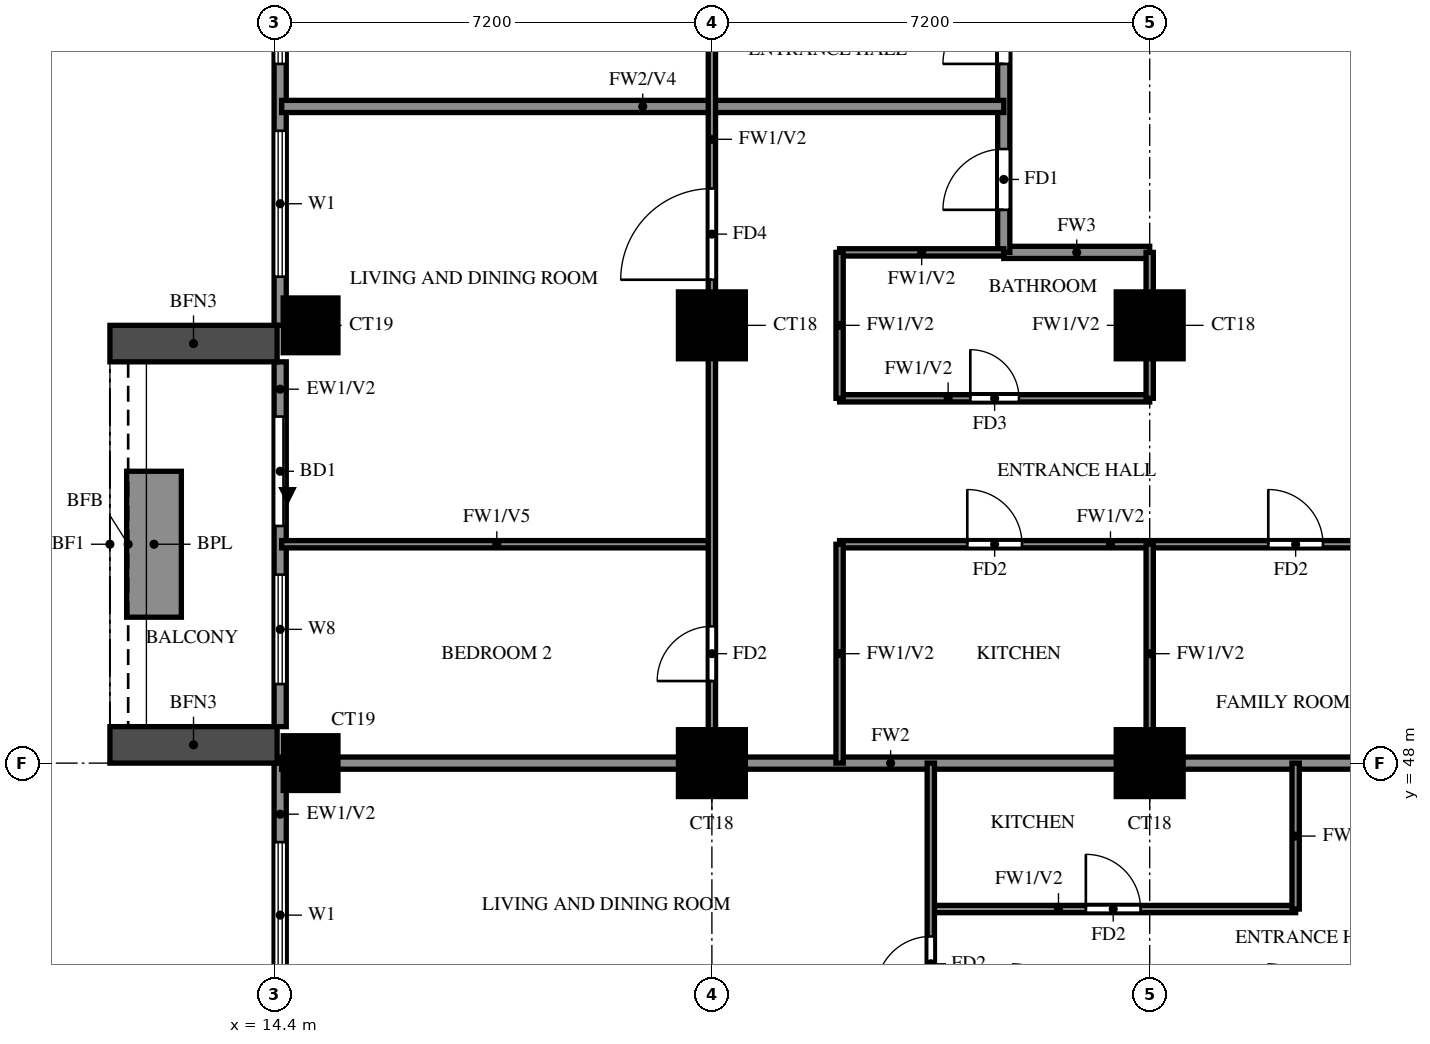
"""IFC4 building model, lengths in metres.
Left out: names, types, materials, properties, quantities, classifications, styles, units other than length and angle.
Written with IfcOpenShell. Run it as: python <this file> out.ifc"""

import sys

from ifc_helpers import new_model, si_unit, direction, frame, frame_2d, origin, origin_2d, place, context, subcontext, project, spatial, rectangle, extrude, source, transform, mapped, element, fill, save


model = new_model("IFC4")
c1 = context("Model", 3, precision=1e-05, world=origin(), true_north=direction((0.0, 1.0)))
c2 = subcontext(c1, "Body", "Model", "MODEL_VIEW")
j1 = project(units=[si_unit("LENGTHUNIT", "METRE"), si_unit("PLANEANGLEUNIT", "RADIAN")], contexts=[c1])
p1 = place(None, origin())
s1 = spatial("IfcSite", under=j1, at=p1, CompositionType="ELEMENT")
p2 = place(p1, origin())
s2 = spatial("IfcBuilding", under=s1, at=p2, CompositionType="ELEMENT")
p3 = place(p2, frame((0.0, 0.0, 130.5)))
s3 = spatial("IfcBuildingStorey", under=s2, at=p3, CompositionType="ELEMENT", Elevation=130.5)
m1 = source(origin(), c2, "Body", "SweptSolid", [
    extrude(rectangle(XDim=0.9, YDim=0.9, at=origin_2d()), origin(), (0.0, 0.0, 1.0), 3.2),
])
p4 = place(p3, frame((15.0, 48.0, 0.0), z_axis=(0.0, 0.0, 1.0), x_axis=(1.0, 0.0, 0.0)))
e1 = element("IfcColumn", 1, at=p4, inside=s3, PredefinedType="COLUMN", context=c2, shape_type="MappedRepresentation", body=[
    mapped(m1, transform((0.0, 0.0, 0.0))),
])
m2 = source(origin(), c2, "Body", "SweptSolid", [
    extrude(rectangle(XDim=1.1, YDim=1.1, at=origin_2d()), origin(), (0.0, 0.0, 1.0), 3.2),
])
for number, where, z_axis, x_axis in (
    (2, (21.6, 48.0, 0.0), (0.0, 0.0, 1.0), (1.0, 0.0, 0.0)),
    (3, (28.8, 48.0, 0.0), (0.0, 0.0, 1.0), (1.0, 0.0, 0.0)),
):
    element("IfcColumn", number, at=place(p3, frame(where, z_axis=z_axis, x_axis=x_axis)), inside=s3, PredefinedType="COLUMN", context=c2, shape_type="MappedRepresentation", body=[
        mapped(m2, transform((0.0, 0.0, 0.0))),
    ])
p5 = place(p3, frame((15.0, 55.2, 0.0), z_axis=(0.0, 0.0, 1.0), x_axis=(1.0, 0.0, 0.0)))
e4 = element("IfcColumn", 4, at=p5, inside=s3, PredefinedType="COLUMN", context=c2, shape_type="MappedRepresentation", body=[
    mapped(m1, transform((0.0, 0.0, 0.0))),
])
for number, where, z_axis, x_axis in (
    (5, (21.6, 55.2, 0.0), (0.0, 0.0, 1.0), (1.0, 0.0, 0.0)),
    (6, (28.8, 55.2, 0.0), (0.0, 0.0, 1.0), (1.0, 0.0, 0.0)),
):
    element("IfcColumn", number, at=place(p3, frame(where, z_axis=z_axis, x_axis=x_axis)), inside=s3, PredefinedType="COLUMN", context=c2, shape_type="MappedRepresentation", body=[
        mapped(m2, transform((0.0, 0.0, 0.0))),
    ])
p6 = place(p3, frame((14.5, 62.4, 0.0), z_axis=(0.0, 0.0, 1.0), x_axis=(0.0, -1.0, 0.0)))
e7 = element("IfcWall", 7, at=p6, inside=s3, PredefinedType="SOLIDWALL", context=c2, shape_type="SweptSolid", body=[
    extrude(rectangle(XDim=7.2, YDim=0.2, at=frame_2d((3.6, 0.0))), origin(), (0.0, 0.0, 1.0), 3.2),
])
p7 = place(p6, frame((4.0, 0.0, 0.6)))
e8 = element("IfcOpeningElement", 8, at=p7, cuts=e7, PredefinedType="OPENING", context=c2, shape_type="SweptSolid", body=[
    extrude(rectangle(XDim=2.4, YDim=2.4, at=frame_2d((1.2, 1.2))), frame((0.0, 0.11, 0.0), z_axis=(0.0, -1.0, 0.0), x_axis=(1.0, 0.0, 0.0)), (0.0, 0.0, 1.0), 0.22),
])
p8 = place(p6, frame((1.1, 0.0, 0.6)))
e9 = element("IfcOpeningElement", 9, at=p8, cuts=e7, PredefinedType="OPENING", context=c2, shape_type="SweptSolid", body=[
    extrude(rectangle(XDim=1.8, YDim=2.4, at=frame_2d((0.9, 1.2))), frame((0.0, 0.11, 0.0), z_axis=(0.0, -1.0, 0.0), x_axis=(1.0, 0.0, 0.0)), (0.0, 0.0, 1.0), 0.22),
])
p9 = place(p3, frame((14.5, 54.6, 0.0), z_axis=(0.0, 0.0, 1.0), x_axis=(0.0, -1.0, 0.0)))
e10 = element("IfcWall", 10, at=p9, inside=s3, PredefinedType="SOLIDWALL", context=c2, shape_type="SweptSolid", body=[
    extrude(rectangle(XDim=6.0, YDim=0.2, at=frame_2d((3.0, 0.0))), origin(), (0.0, 0.0, 1.0), 3.2),
])
p10 = place(p9, frame((0.9, 0.0, 0.0)))
e11 = element("IfcOpeningElement", 11, at=p10, cuts=e10, PredefinedType="OPENING", context=c2, shape_type="SweptSolid", body=[
    extrude(rectangle(XDim=1.8, YDim=2.4, at=frame_2d((0.9, 1.2))), frame((0.0, 0.11, 0.0), z_axis=(0.0, -1.0, 0.0), x_axis=(1.0, 0.0, 0.0)), (0.0, 0.0, 1.0), 0.22),
])
p11 = place(p9, frame((3.5, 0.0, 0.6)))
e12 = element("IfcOpeningElement", 12, at=p11, cuts=e10, PredefinedType="OPENING", context=c2, shape_type="SweptSolid", body=[
    extrude(rectangle(XDim=1.8, YDim=2.4, at=frame_2d((0.9, 1.2))), frame((0.0, 0.11, 0.0), z_axis=(0.0, -1.0, 0.0), x_axis=(1.0, 0.0, 0.0)), (0.0, 0.0, 1.0), 0.22),
])
p12 = place(p3, frame((14.5, 48.0, 0.0), z_axis=(0.0, 0.0, 1.0), x_axis=(0.0, -1.0, 0.0)))
e13 = element("IfcWall", 13, at=p12, inside=s3, PredefinedType="SOLIDWALL", context=c2, shape_type="SweptSolid", body=[
    extrude(rectangle(XDim=4.8, YDim=0.2, at=frame_2d((2.4, 0.0))), origin(), (0.0, 0.0, 1.0), 3.2),
])
p13 = place(p12, frame((1.3, 0.0, 0.6)))
e14 = element("IfcOpeningElement", 14, at=p13, cuts=e13, PredefinedType="OPENING", context=c2, shape_type="SweptSolid", body=[
    extrude(rectangle(XDim=2.4, YDim=2.4, at=frame_2d((1.2, 1.2))), frame((0.0, 0.11, 0.0), z_axis=(0.0, -1.0, 0.0), x_axis=(1.0, 0.0, 0.0)), (0.0, 0.0, 1.0), 0.22),
])
for number, where, z_axis, x_axis in (
    (15, (14.45, 54.9, 0.0), (0.0, 0.0, 1.0), (-1.0, 0.0, 0.0)),
    (16, (14.45, 48.3, 0.0), (0.0, 0.0, 1.0), (-1.0, 0.0, 0.0)),
):
    element("IfcWall", number, at=place(p3, frame(where, z_axis=z_axis, x_axis=x_axis)), inside=s3, PredefinedType="SOLIDWALL", context=c2, shape_type="SweptSolid", body=[
        extrude(rectangle(XDim=2.75, YDim=0.6, at=frame_2d((1.375, 0.0))), origin(), (0.0, 0.0, 1.0), 2.85),
    ])
p14 = place(p3, frame((12.425, 52.8, 0.0), z_axis=(0.0, 0.0, 1.0), x_axis=(0.0, -1.0, 0.0)))
e17 = element("IfcWall", 17, at=p14, inside=s3, PredefinedType="SOLIDWALL", context=c2, shape_type="SweptSolid", body=[
    extrude(rectangle(XDim=2.4, YDim=0.9, at=frame_2d((1.2, 0.0))), origin(), (0.0, 0.0, 1.0), 0.9),
])
p15 = place(p3, frame((26.4, 56.4, 0.0), z_axis=(0.0, 0.0, 1.0), x_axis=(1.0, 0.0, 0.0)))
e18 = element("IfcWall", 18, at=p15, inside=s3, PredefinedType="SOLIDWALL", context=c2, shape_type="SweptSolid", body=[
    extrude(rectangle(XDim=2.4, YDim=0.2, at=frame_2d((1.2, 0.0))), origin(), (0.0, 0.0, 1.0), 3.2),
])
p16 = place(p3, frame((26.4, 56.4, 0.0), z_axis=(0.0, 0.0, 1.0), x_axis=(0.0, 1.0, 0.0)))
e19 = element("IfcWall", 19, at=p16, inside=s3, PredefinedType="SOLIDWALL", context=c2, shape_type="SweptSolid", body=[
    extrude(rectangle(XDim=9.6, YDim=0.2, at=frame_2d((4.8, 0.0))), origin(), (0.0, 0.0, 1.0), 3.2),
])
p17 = place(p16, frame((0.7, 0.0, 0.0)))
e20 = element("IfcOpeningElement", 20, at=p17, cuts=e19, PredefinedType="OPENING", context=c2, shape_type="SweptSolid", body=[
    extrude(rectangle(XDim=1.0, YDim=2.1, at=frame_2d((0.5, 1.05))), frame((0.0, 0.11, 0.0), z_axis=(0.0, -1.0, 0.0), x_axis=(1.0, 0.0, 0.0)), (0.0, 0.0, 1.0), 0.22),
])
p18 = place(p16, frame((3.1, 0.0, 0.0)))
e21 = element("IfcOpeningElement", 21, at=p18, cuts=e19, PredefinedType="OPENING", context=c2, shape_type="SweptSolid", body=[
    extrude(rectangle(XDim=1.0, YDim=2.1, at=frame_2d((0.5, 1.05))), frame((0.0, 0.11, 0.0), z_axis=(0.0, -1.0, 0.0), x_axis=(1.0, 0.0, 0.0)), (0.0, 0.0, 1.0), 0.22),
])
p19 = place(p3, frame((14.525, 48.0, 0.0), z_axis=(0.0, 0.0, 1.0), x_axis=(1.0, 0.0, 0.0)))
e22 = element("IfcWall", 22, at=p19, inside=s3, PredefinedType="SOLIDWALL", context=c2, shape_type="SweptSolid", body=[
    extrude(rectangle(XDim=19.075, YDim=0.2, at=frame_2d((9.538, 0.0))), origin(), (0.0, 0.0, 1.0), 3.2),
])
p20 = place(p3, frame((14.525, 58.8, 0.0), z_axis=(0.0, 0.0, 1.0), x_axis=(1.0, 0.0, 0.0)))
e23 = element("IfcWall", 23, at=p20, inside=s3, PredefinedType="SOLIDWALL", context=c2, shape_type="SweptSolid", body=[
    extrude(rectangle(XDim=11.875, YDim=0.2, at=frame_2d((5.938, 0.0))), origin(), (0.0, 0.0, 1.0), 2.3),
])
p21 = place(p3, frame((25.2, 45.6, 0.0), z_axis=(0.0, 0.0, 1.0), x_axis=(1.0, 0.0, 0.0)))
e24 = element("IfcWall", 24, at=p21, inside=s3, PredefinedType="PARTITIONING", context=c2, shape_type="SweptSolid", body=[
    extrude(rectangle(XDim=6.0, YDim=0.12, at=frame_2d((3.0, 0.0))), origin(), (0.0, 0.0, 1.0), 3.2),
])
p22 = place(p21, frame((2.55, 0.0, 0.0)))
e25 = element("IfcOpeningElement", 25, at=p22, cuts=e24, PredefinedType="OPENING", context=c2, shape_type="SweptSolid", body=[
    extrude(rectangle(XDim=0.9, YDim=2.1, at=frame_2d((0.45, 1.05))), frame((0.0, 0.07, 0.0), z_axis=(0.0, -1.0, 0.0), x_axis=(1.0, 0.0, 0.0)), (0.0, 0.0, 1.0), 0.14),
])
p23 = place(p3, frame((14.525, 51.6, 0.0), z_axis=(0.0, 0.0, 1.0), x_axis=(1.0, 0.0, 0.0)))
e26 = element("IfcWall", 26, at=p23, inside=s3, PredefinedType="PARTITIONING", context=c2, shape_type="SweptSolid", body=[
    extrude(rectangle(XDim=7.075, YDim=0.12, at=frame_2d((3.538, 0.0))), origin(), (0.0, 0.0, 1.0), 2.3),
])
p24 = place(p3, frame((23.7, 51.6, 0.0), z_axis=(0.0, 0.0, 1.0), x_axis=(1.0, 0.0, 0.0)))
e27 = element("IfcWall", 27, at=p24, inside=s3, PredefinedType="PARTITIONING", context=c2, shape_type="SweptSolid", body=[
    extrude(rectangle(XDim=9.9, YDim=0.12, at=frame_2d((4.95, 0.0))), origin(), (0.0, 0.0, 1.0), 3.2),
])
p25 = place(p24, frame((2.1, 0.0, 0.0)))
e28 = element("IfcOpeningElement", 28, at=p25, cuts=e27, PredefinedType="OPENING", context=c2, shape_type="SweptSolid", body=[
    extrude(rectangle(XDim=0.9, YDim=2.1, at=frame_2d((0.45, 1.05))), frame((0.0, 0.07, 0.0), z_axis=(0.0, -1.0, 0.0), x_axis=(1.0, 0.0, 0.0)), (0.0, 0.0, 1.0), 0.14),
])
p26 = place(p24, frame((7.05, 0.0, 0.0)))
e29 = element("IfcOpeningElement", 29, at=p26, cuts=e27, PredefinedType="OPENING", context=c2, shape_type="SweptSolid", body=[
    extrude(rectangle(XDim=0.9, YDim=2.1, at=frame_2d((0.45, 1.05))), frame((0.0, 0.07, 0.0), z_axis=(0.0, -1.0, 0.0), x_axis=(1.0, 0.0, 0.0)), (0.0, 0.0, 1.0), 0.14),
])
p27 = place(p3, frame((23.7, 54.0, 0.0), z_axis=(0.0, 0.0, 1.0), x_axis=(1.0, 0.0, 0.0)))
e30 = element("IfcWall", 30, at=p27, inside=s3, PredefinedType="PARTITIONING", context=c2, shape_type="SweptSolid", body=[
    extrude(rectangle(XDim=5.1, YDim=0.12, at=frame_2d((2.55, 0.0))), origin(), (0.0, 0.0, 1.0), 3.2),
])
p28 = place(p27, frame((2.15, 0.0, 0.0)))
e31 = element("IfcOpeningElement", 31, at=p28, cuts=e30, PredefinedType="OPENING", context=c2, shape_type="SweptSolid", body=[
    extrude(rectangle(XDim=0.8, YDim=2.1, at=frame_2d((0.4, 1.05))), frame((0.0, 0.07, 0.0), z_axis=(0.0, -1.0, 0.0), x_axis=(1.0, 0.0, 0.0)), (0.0, 0.0, 1.0), 0.14),
])
p29 = place(p3, frame((23.7, 56.4, 0.0), z_axis=(0.0, 0.0, 1.0), x_axis=(1.0, 0.0, 0.0)))
e32 = element("IfcWall", 32, at=p29, inside=s3, PredefinedType="PARTITIONING", context=c2, shape_type="SweptSolid", body=[
    extrude(rectangle(XDim=2.7, YDim=0.12, at=frame_2d((1.35, 0.0))), origin(), (0.0, 0.0, 1.0), 3.2),
])
p30 = place(p3, frame((21.6, 48.0, 0.0), z_axis=(0.0, 0.0, 1.0), x_axis=(0.0, 1.0, 0.0)))
e33 = element("IfcWall", 33, at=p30, inside=s3, PredefinedType="PARTITIONING", context=c2, shape_type="SweptSolid", body=[
    extrude(rectangle(XDim=21.6, YDim=0.12, at=frame_2d((10.8, 0.0))), origin(), (0.0, 0.0, 1.0), 3.2),
])
p31 = place(p30, frame((1.35, 0.0, 0.0)))
e34 = element("IfcOpeningElement", 34, at=p31, cuts=e33, PredefinedType="OPENING", context=c2, shape_type="SweptSolid", body=[
    extrude(rectangle(XDim=0.9, YDim=2.1, at=frame_2d((0.45, 1.05))), frame((0.0, 0.07, 0.0), z_axis=(0.0, -1.0, 0.0), x_axis=(1.0, 0.0, 0.0)), (0.0, 0.0, 1.0), 0.14),
])
p32 = place(p30, frame((7.95, 0.0, 0.0)))
e35 = element("IfcOpeningElement", 35, at=p32, cuts=e33, PredefinedType="OPENING", context=c2, shape_type="SweptSolid", body=[
    extrude(rectangle(XDim=1.5, YDim=2.1, at=frame_2d((0.75, 1.05))), frame((0.0, 0.07, 0.0), z_axis=(0.0, -1.0, 0.0), x_axis=(1.0, 0.0, 0.0)), (0.0, 0.0, 1.0), 0.14),
])
p33 = place(p30, frame((12.15, 0.0, 0.0)))
e36 = element("IfcOpeningElement", 36, at=p33, cuts=e33, PredefinedType="OPENING", context=c2, shape_type="SweptSolid", body=[
    extrude(rectangle(XDim=0.9, YDim=2.1, at=frame_2d((0.45, 1.05))), frame((0.0, 0.07, 0.0), z_axis=(0.0, -1.0, 0.0), x_axis=(1.0, 0.0, 0.0)), (0.0, 0.0, 1.0), 0.14),
])
p34 = place(p30, frame((17.55, 0.0, 0.0)))
e37 = element("IfcOpeningElement", 37, at=p34, cuts=e33, PredefinedType="OPENING", context=c2, shape_type="SweptSolid", body=[
    extrude(rectangle(XDim=0.9, YDim=2.1, at=frame_2d((0.45, 1.05))), frame((0.0, 0.07, 0.0), z_axis=(0.0, -1.0, 0.0), x_axis=(1.0, 0.0, 0.0)), (0.0, 0.0, 1.0), 0.14),
])
p35 = place(p3, frame((23.7, 48.0, 0.0), z_axis=(0.0, 0.0, 1.0), x_axis=(0.0, 1.0, 0.0)))
e38 = element("IfcWall", 38, at=p35, inside=s3, PredefinedType="PARTITIONING", context=c2, shape_type="SweptSolid", body=[
    extrude(rectangle(XDim=3.6, YDim=0.12, at=frame_2d((1.8, 0.0))), origin(), (0.0, 0.0, 1.0), 3.2),
])
p36 = place(p3, frame((23.7, 54.0, 0.0), z_axis=(0.0, 0.0, 1.0), x_axis=(0.0, 1.0, 0.0)))
e39 = element("IfcWall", 39, at=p36, inside=s3, PredefinedType="PARTITIONING", context=c2, shape_type="SweptSolid", body=[
    extrude(rectangle(XDim=2.4, YDim=0.12, at=frame_2d((1.2, 0.0))), origin(), (0.0, 0.0, 1.0), 3.2),
])
p37 = place(p3, frame((25.2, 39.725, 0.0), z_axis=(0.0, 0.0, 1.0), x_axis=(0.0, 1.0, 0.0)))
e40 = element("IfcWall", 40, at=p37, inside=s3, PredefinedType="PARTITIONING", context=c2, shape_type="SweptSolid", body=[
    extrude(rectangle(XDim=8.275, YDim=0.12, at=frame_2d((4.137, 0.0))), origin(), (0.0, 0.0, 1.0), 3.2),
])
p38 = place(p37, frame((4.525, 0.0, 0.0)))
e41 = element("IfcOpeningElement", 41, at=p38, cuts=e40, PredefinedType="OPENING", context=c2, shape_type="SweptSolid", body=[
    extrude(rectangle(XDim=0.9, YDim=2.1, at=frame_2d((0.45, 1.05))), frame((0.0, 0.07, 0.0), z_axis=(0.0, -1.0, 0.0), x_axis=(1.0, 0.0, 0.0)), (0.0, 0.0, 1.0), 0.14),
])
p39 = place(p3, frame((28.8, 48.0, 0.0), z_axis=(0.0, 0.0, 1.0), x_axis=(0.0, 1.0, 0.0)))
e42 = element("IfcWall", 42, at=p39, inside=s3, PredefinedType="PARTITIONING", context=c2, shape_type="SweptSolid", body=[
    extrude(rectangle(XDim=3.6, YDim=0.12, at=frame_2d((1.8, 0.0))), origin(), (0.0, 0.0, 1.0), 3.2),
])
for number, where, z_axis, x_axis in (
    (43, (28.8, 54.0, 0.0), (0.0, 0.0, 1.0), (0.0, 1.0, 0.0)),
    (44, (31.2, 45.6, 0.0), (0.0, 0.0, 1.0), (0.0, 1.0, 0.0)),
):
    element("IfcWall", number, at=place(p3, frame(where, z_axis=z_axis, x_axis=x_axis)), inside=s3, PredefinedType="PARTITIONING", context=c2, shape_type="SweptSolid", body=[
        extrude(rectangle(XDim=2.4, YDim=0.12, at=frame_2d((1.2, 0.0))), origin(), (0.0, 0.0, 1.0), 3.2),
    ])
p40 = place(p7, origin())
e45 = element("IfcWindow", 45, at=p40, inside=s3, PartitioningType="DOUBLE_PANEL_VERTICAL", PredefinedType="WINDOW", context=c2, shape_type="SweptSolid", body=[
    extrude(rectangle(XDim=2.4, YDim=2.4, at=frame_2d((1.2, 1.2))), frame((0.0, 0.03, 0.0), z_axis=(0.0, -1.0, 0.0), x_axis=(1.0, 0.0, 0.0)), (0.0, 0.0, 1.0), 0.06),
])
fill(e8, e45)
p41 = place(p8, origin())
e46 = element("IfcWindow", 46, at=p41, inside=s3, PartitioningType="DOUBLE_PANEL_VERTICAL", PredefinedType="WINDOW", context=c2, shape_type="SweptSolid", body=[
    extrude(rectangle(XDim=1.8, YDim=2.4, at=frame_2d((0.9, 1.2))), frame((0.0, 0.03, 0.0), z_axis=(0.0, -1.0, 0.0), x_axis=(1.0, 0.0, 0.0)), (0.0, 0.0, 1.0), 0.06),
])
fill(e9, e46)
p42 = place(p10, origin())
e47 = element("IfcDoor", 47, at=p42, inside=s3, OperationType="DOUBLE_DOOR_SLIDING", PredefinedType="DOOR", context=c2, shape_type="SweptSolid", body=[
    extrude(rectangle(XDim=1.8, YDim=2.4, at=frame_2d((0.9, 1.2))), frame((0.0, 0.025, 0.0), z_axis=(0.0, -1.0, 0.0), x_axis=(1.0, 0.0, 0.0)), (0.0, 0.0, 1.0), 0.05),
])
fill(e11, e47)
p43 = place(p11, origin())
e48 = element("IfcWindow", 48, at=p43, inside=s3, PartitioningType="DOUBLE_PANEL_VERTICAL", PredefinedType="WINDOW", context=c2, shape_type="SweptSolid", body=[
    extrude(rectangle(XDim=1.8, YDim=2.4, at=frame_2d((0.9, 1.2))), frame((0.0, 0.03, 0.0), z_axis=(0.0, -1.0, 0.0), x_axis=(1.0, 0.0, 0.0)), (0.0, 0.0, 1.0), 0.06),
])
fill(e12, e48)
p44 = place(p13, origin())
e49 = element("IfcWindow", 49, at=p44, inside=s3, PartitioningType="DOUBLE_PANEL_VERTICAL", PredefinedType="WINDOW", context=c2, shape_type="SweptSolid", body=[
    extrude(rectangle(XDim=2.4, YDim=2.4, at=frame_2d((1.2, 1.2))), frame((0.0, 0.03, 0.0), z_axis=(0.0, -1.0, 0.0), x_axis=(1.0, 0.0, 0.0)), (0.0, 0.0, 1.0), 0.06),
])
fill(e14, e49)
p45 = place(p38, origin())
e50 = element("IfcDoor", 50, at=p45, inside=s3, OperationType="SINGLE_SWING_LEFT", PredefinedType="DOOR", context=c2, shape_type="SweptSolid", body=[
    extrude(rectangle(XDim=0.9, YDim=2.1, at=frame_2d((0.45, 1.05))), frame((0.0, 0.025, 0.0), z_axis=(0.0, -1.0, 0.0), x_axis=(1.0, 0.0, 0.0)), (0.0, 0.0, 1.0), 0.05),
])
fill(e41, e50)
p46 = place(p22, origin())
e51 = element("IfcDoor", 51, at=p46, inside=s3, OperationType="SINGLE_SWING_LEFT", PredefinedType="DOOR", context=c2, shape_type="SweptSolid", body=[
    extrude(rectangle(XDim=0.9, YDim=2.1, at=frame_2d((0.45, 1.05))), frame((0.0, 0.025, 0.0), z_axis=(0.0, -1.0, 0.0), x_axis=(1.0, 0.0, 0.0)), (0.0, 0.0, 1.0), 0.05),
])
fill(e25, e51)
p47 = place(p17, origin())
e52 = element("IfcDoor", 52, at=p47, inside=s3, OperationType="SINGLE_SWING_LEFT", PredefinedType="DOOR", context=c2, shape_type="SweptSolid", body=[
    extrude(rectangle(XDim=1.0, YDim=2.1, at=frame_2d((0.5, 1.05))), frame((0.0, 0.025, 0.0), z_axis=(0.0, -1.0, 0.0), x_axis=(1.0, 0.0, 0.0)), (0.0, 0.0, 1.0), 0.05),
])
fill(e20, e52)
p48 = place(p31, origin())
e53 = element("IfcDoor", 53, at=p48, inside=s3, OperationType="SINGLE_SWING_LEFT", PredefinedType="DOOR", context=c2, shape_type="SweptSolid", body=[
    extrude(rectangle(XDim=0.9, YDim=2.1, at=frame_2d((0.45, 1.05))), frame((0.0, 0.025, 0.0), z_axis=(0.0, -1.0, 0.0), x_axis=(1.0, 0.0, 0.0)), (0.0, 0.0, 1.0), 0.05),
])
fill(e34, e53)
p49 = place(p32, origin())
e54 = element("IfcDoor", 54, at=p49, inside=s3, OperationType="SINGLE_SWING_LEFT", PredefinedType="DOOR", context=c2, shape_type="SweptSolid", body=[
    extrude(rectangle(XDim=1.5, YDim=2.1, at=frame_2d((0.75, 1.05))), frame((0.0, 0.025, 0.0), z_axis=(0.0, -1.0, 0.0), x_axis=(1.0, 0.0, 0.0)), (0.0, 0.0, 1.0), 0.05),
])
fill(e35, e54)
p50 = place(p25, origin())
e55 = element("IfcDoor", 55, at=p50, inside=s3, OperationType="SINGLE_SWING_LEFT", PredefinedType="DOOR", context=c2, shape_type="SweptSolid", body=[
    extrude(rectangle(XDim=0.9, YDim=2.1, at=frame_2d((0.45, 1.05))), frame((0.0, 0.025, 0.0), z_axis=(0.0, -1.0, 0.0), x_axis=(1.0, 0.0, 0.0)), (0.0, 0.0, 1.0), 0.05),
])
fill(e28, e55)
p51 = place(p28, origin())
e56 = element("IfcDoor", 56, at=p51, inside=s3, OperationType="SINGLE_SWING_LEFT", PredefinedType="DOOR", context=c2, shape_type="SweptSolid", body=[
    extrude(rectangle(XDim=0.8, YDim=2.1, at=frame_2d((0.4, 1.05))), frame((0.0, 0.025, 0.0), z_axis=(0.0, -1.0, 0.0), x_axis=(1.0, 0.0, 0.0)), (0.0, 0.0, 1.0), 0.05),
])
fill(e31, e56)
p52 = place(p26, origin())
e57 = element("IfcDoor", 57, at=p52, inside=s3, OperationType="SINGLE_SWING_RIGHT", PredefinedType="DOOR", context=c2, shape_type="SweptSolid", body=[
    extrude(rectangle(XDim=0.9, YDim=2.1, at=frame_2d((0.45, 1.05))), frame((0.0, 0.025, 0.0), z_axis=(0.0, -1.0, 0.0), x_axis=(1.0, 0.0, 0.0)), (0.0, 0.0, 1.0), 0.05),
])
fill(e29, e57)
p53 = place(p18, origin())
e58 = element("IfcDoor", 58, at=p53, inside=s3, OperationType="SINGLE_SWING_RIGHT", PredefinedType="DOOR", context=c2, shape_type="SweptSolid", body=[
    extrude(rectangle(XDim=1.0, YDim=2.1, at=frame_2d((0.5, 1.05))), frame((0.0, 0.025, 0.0), z_axis=(0.0, -1.0, 0.0), x_axis=(1.0, 0.0, 0.0)), (0.0, 0.0, 1.0), 0.05),
])
fill(e21, e58)
save(model, sys.argv[1])
